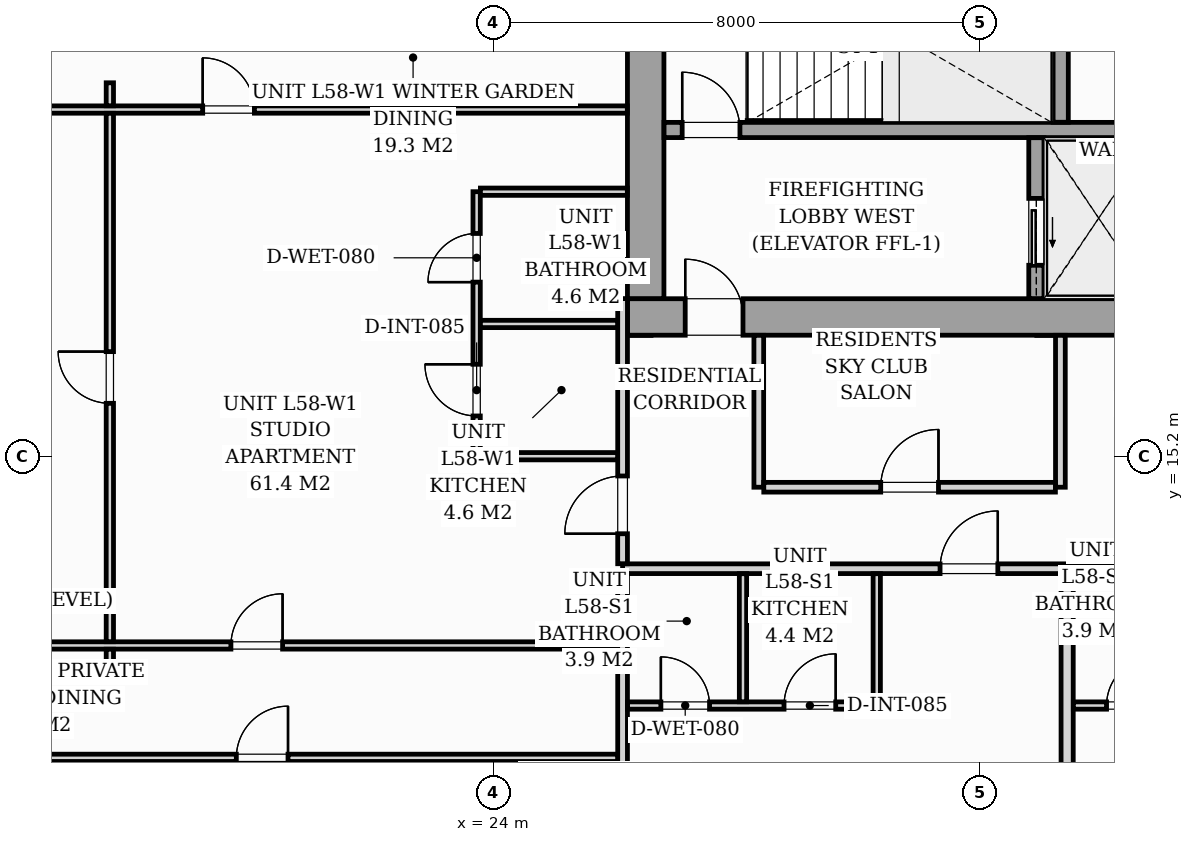
"""IFC4 building model, lengths in metres.
Left out: names, types, materials, properties, quantities, classifications, styles, units other than length and angle.
Written with IfcOpenShell. Run it as: python <this file> out.ifc"""

import sys

from ifc_helpers import new_model, si_unit, direction, frame, frame_2d, origin, origin_2d, place, context, subcontext, project, spatial, rectangle, i_section, extrude, source, transform, mapped, element, fill, save


model = new_model("IFC4")
c1 = context("Model", 3, precision=1e-05, world=origin(), true_north=direction((0.0, 1.0)))
c2 = subcontext(c1, "Body", "Model", "MODEL_VIEW")
j1 = project(units=[si_unit("LENGTHUNIT", "METRE"), si_unit("PLANEANGLEUNIT", "RADIAN")], contexts=[c1])
p1 = place(None, origin())
s1 = spatial("IfcSite", under=j1, at=p1, CompositionType="ELEMENT")
p2 = place(p1, origin())
s2 = spatial("IfcBuilding", under=s1, at=p2, CompositionType="ELEMENT")
p3 = place(p2, frame((0.0, 0.0, 201.8)))
s3 = spatial("IfcBuildingStorey", under=s2, at=p3, CompositionType="ELEMENT", Elevation=201.8)
m1 = source(origin(), c2, "Body", "SweptSolid", [
    extrude(i_section(OverallWidth=0.416, OverallDepth=0.446, WebThickness=0.039, FlangeThickness=0.063, FilletRadius=0.018, at=origin_2d()), origin(), (0.0, 0.0, 1.0), 3.196),
])
for number, where, z_axis, x_axis in (
    (1, (26.4, 17.4, 0.002), (0.0, 0.0, 1.0), (1.0, 0.0, 0.0)),
    (2, (33.12, 17.4, 0.002), (0.0, 0.0, 1.0), (1.0, 0.0, 0.0)),
):
    element("IfcColumn", number, at=place(p3, frame(where, z_axis=z_axis, x_axis=x_axis)), inside=s3, PredefinedType="PILASTER", context=c2, shape_type="MappedRepresentation", body=[
        mapped(m1, transform((0.0, 0.0, 0.0), scale=1.0)),
    ])
p4 = place(p3, frame((26.2, 17.5, 0.0), z_axis=(0.0, 0.0, 1.0), x_axis=(1.0, 0.0, 0.0)))
e3 = element("IfcWall", 3, at=p4, inside=s3, PredefinedType="SHEAR", context=c2, shape_type="SweptSolid", body=[
    extrude(rectangle(XDim=19.6, YDim=0.6, at=frame_2d((9.8, 0.0))), origin(), (0.0, 0.0, 1.0), 3.2),
])
p5 = place(p4, frame((0.95, 0.0, 0.0)))
e4 = element("IfcOpeningElement", 4, at=p5, cuts=e3, PredefinedType="OPENING", context=c2, shape_type="SweptSolid", body=[
    extrude(rectangle(XDim=0.95, YDim=2.06, at=frame_2d((0.475, 1.03))), frame((0.0, 0.31, 0.0), z_axis=(0.0, -1.0, 0.0), x_axis=(1.0, 0.0, 0.0)), (0.0, 0.0, 1.0), 0.62),
])
p6 = place(p4, frame((9.38, 0.0, 0.0)))
e5 = element("IfcOpeningElement", 5, at=p6, cuts=e3, PredefinedType="OPENING", context=c2, shape_type="SweptSolid", body=[
    extrude(rectangle(XDim=0.85, YDim=2.0, at=frame_2d((0.425, 1.0))), frame((0.0, 0.31, 0.0), z_axis=(0.0, -1.0, 0.0), x_axis=(1.0, 0.0, 0.0)), (0.0, 0.0, 1.0), 0.62),
])
p7 = place(p4, frame((17.55, 0.0, 0.0)))
e6 = element("IfcOpeningElement", 6, at=p7, cuts=e3, PredefinedType="OPENING", context=c2, shape_type="SweptSolid", body=[
    extrude(rectangle(XDim=0.95, YDim=2.06, at=frame_2d((0.475, 1.03))), frame((0.0, 0.31, 0.0), z_axis=(0.0, -1.0, 0.0), x_axis=(1.0, 0.0, 0.0)), (0.0, 0.0, 1.0), 0.62),
])
p8 = place(p3, frame((26.5, 17.802, 0.0), z_axis=(0.0, 0.0, 1.0), x_axis=(0.0, 1.0, 0.0)))
e7 = element("IfcWall", 7, at=p8, inside=s3, PredefinedType="SHEAR", context=c2, shape_type="SweptSolid", body=[
    extrude(rectangle(XDim=5.796, YDim=0.6, at=frame_2d((2.898, 0.0))), origin(), (0.0, 0.0, 1.0), 3.2),
])
p9 = place(p3, frame((26.802, 20.575, 0.0), z_axis=(0.0, 0.0, 1.0), x_axis=(1.0, 0.0, 0.0)))
e8 = element("IfcWall", 8, at=p9, inside=s3, PredefinedType="SOLIDWALL", context=c2, shape_type="SweptSolid", body=[
    extrude(rectangle(XDim=8.148, YDim=0.25, at=frame_2d((4.074, 0.0))), origin(), (0.0, 0.0, 1.0), 3.2),
])
p10 = place(p9, frame((0.298, 0.0, 0.0)))
e9 = element("IfcOpeningElement", 9, at=p10, cuts=e8, PredefinedType="OPENING", context=c2, shape_type="SweptSolid", body=[
    extrude(rectangle(XDim=0.95, YDim=2.06, at=frame_2d((0.475, 1.03))), frame((0.0, 0.135, 0.0), z_axis=(0.0, -1.0, 0.0), x_axis=(1.0, 0.0, 0.0)), (0.0, 0.0, 1.0), 0.27),
])
p11 = place(p3, frame((33.325, 20.702, 0.0), z_axis=(0.0, 0.0, 1.0), x_axis=(0.0, 1.0, 0.0)))
e10 = element("IfcWall", 10, at=p11, inside=s3, PredefinedType="SOLIDWALL", context=c2, shape_type="SweptSolid", body=[
    extrude(rectangle(XDim=2.896, YDim=0.25, at=frame_2d((1.448, 0.0))), origin(), (0.0, 0.0, 1.0), 3.2),
])
p12 = place(p3, frame((32.925, 17.802, 0.0), z_axis=(0.0, 0.0, 1.0), x_axis=(0.0, 1.0, 0.0)))
e11 = element("IfcWall", 11, at=p12, inside=s3, PredefinedType="SOLIDWALL", context=c2, shape_type="SweptSolid", body=[
    extrude(rectangle(XDim=2.646, YDim=0.25, at=frame_2d((1.323, 0.0))), origin(), (0.0, 0.0, 1.0), 3.2),
])
p13 = place(p12, frame((0.548, 0.0, 0.0)))
e12 = element("IfcOpeningElement", 12, at=p13, cuts=e11, PredefinedType="OPENING", context=c2, shape_type="SweptSolid", body=[
    extrude(rectangle(XDim=1.1, YDim=2.08, at=frame_2d((0.55, 1.04))), frame((0.0, 0.135, 0.0), z_axis=(0.0, -1.0, 0.0), x_axis=(1.0, 0.0, 0.0)), (0.0, 0.0, 1.0), 0.27),
])
p14 = place(p3, frame((26.12, 13.36, 0.0), z_axis=(0.0, 0.0, 1.0), x_axis=(1.0, 0.0, 0.0)))
e13 = element("IfcWall", 13, at=p14, inside=s3, PredefinedType="PARTITIONING", context=c2, shape_type="SweptSolid", body=[
    extrude(rectangle(XDim=19.76, YDim=0.16, at=frame_2d((9.88, 0.0))), origin(), (0.0, 0.0, 1.0), 2.94),
])
p15 = place(p14, frame((5.221, 0.0, 0.0)))
e14 = element("IfcOpeningElement", 14, at=p15, cuts=e13, PredefinedType="OPENING", context=c2, shape_type="SweptSolid", body=[
    extrude(rectangle(XDim=0.95, YDim=2.06, at=frame_2d((0.475, 1.03))), frame((0.0, 0.09, 0.0), z_axis=(0.0, -1.0, 0.0), x_axis=(1.0, 0.0, 0.0)), (0.0, 0.0, 1.0), 0.18),
])
p16 = place(p14, frame((12.119, 0.0, 0.0)))
e15 = element("IfcOpeningElement", 15, at=p16, cuts=e13, PredefinedType="OPENING", context=c2, shape_type="SweptSolid", body=[
    extrude(rectangle(XDim=0.95, YDim=2.06, at=frame_2d((0.475, 1.03))), frame((0.0, 0.09, 0.0), z_axis=(0.0, -1.0, 0.0), x_axis=(1.0, 0.0, 0.0)), (0.0, 0.0, 1.0), 0.18),
])
p17 = place(p14, frame((14.492, 0.0, 0.0)))
e16 = element("IfcOpeningElement", 16, at=p17, cuts=e13, PredefinedType="OPENING", context=c2, shape_type="SweptSolid", body=[
    extrude(rectangle(XDim=0.95, YDim=2.06, at=frame_2d((0.475, 1.03))), frame((0.0, 0.09, 0.0), z_axis=(0.0, -1.0, 0.0), x_axis=(1.0, 0.0, 0.0)), (0.0, 0.0, 1.0), 0.18),
])
p18 = place(p3, frame((26.12, 7.261, 0.0), z_axis=(0.0, 0.0, 1.0), x_axis=(0.0, 1.0, 0.0)))
e17 = element("IfcWall", 17, at=p18, inside=s3, PredefinedType="PARTITIONING", context=c2, shape_type="SweptSolid", body=[
    extrude(rectangle(XDim=6.017, YDim=0.16, at=frame_2d((3.008, 0.0))), origin(), (0.0, 0.0, 1.0), 2.94),
])
p19 = place(p3, frame((26.12, 13.442, 0.0), z_axis=(0.0, 0.0, 1.0), x_axis=(0.0, 1.0, 0.0)))
e18 = element("IfcWall", 18, at=p19, inside=s3, PredefinedType="PARTITIONING", context=c2, shape_type="SweptSolid", body=[
    extrude(rectangle(XDim=4.36, YDim=0.16, at=frame_2d((2.18, 0.0))), origin(), (0.0, 0.0, 1.0), 2.94),
])
p20 = place(p19, frame((0.493, 0.0, 0.0)))
e19 = element("IfcOpeningElement", 19, at=p20, cuts=e18, PredefinedType="OPENING", context=c2, shape_type="SweptSolid", body=[
    extrude(rectangle(XDim=0.95, YDim=2.06, at=frame_2d((0.475, 1.03))), frame((0.0, 0.09, 0.0), z_axis=(0.0, -1.0, 0.0), x_axis=(1.0, 0.0, 0.0)), (0.0, 0.0, 1.0), 0.18),
])
p21 = place(p3, frame((26.202, 11.11, 0.0), z_axis=(0.0, 0.0, 1.0), x_axis=(1.0, 0.0, 0.0)))
e20 = element("IfcWall", 20, at=p21, inside=s3, PredefinedType="PARTITIONING", context=c2, shape_type="SweptSolid", body=[
    extrude(rectangle(XDim=4.098, YDim=0.12, at=frame_2d((2.049, 0.0))), origin(), (0.0, 0.0, 1.0), 2.94),
])
p22 = place(p21, frame((0.548, 0.0, 0.0)))
e21 = element("IfcOpeningElement", 21, at=p22, cuts=e20, PredefinedType="OPENING", context=c2, shape_type="SweptSolid", body=[
    extrude(rectangle(XDim=0.8, YDim=2.02, at=frame_2d((0.4, 1.01))), frame((0.0, 0.07, 0.0), z_axis=(0.0, -1.0, 0.0), x_axis=(1.0, 0.0, 0.0)), (0.0, 0.0, 1.0), 0.14),
])
p23 = place(p21, frame((2.573, 0.0, 0.0)))
e22 = element("IfcOpeningElement", 22, at=p23, cuts=e20, PredefinedType="OPENING", context=c2, shape_type="SweptSolid", body=[
    extrude(rectangle(XDim=0.85, YDim=2.05, at=frame_2d((0.425, 1.025))), frame((0.0, 0.07, 0.0), z_axis=(0.0, -1.0, 0.0), x_axis=(1.0, 0.0, 0.0)), (0.0, 0.0, 1.0), 0.14),
])
for number, where, z_axis, x_axis in (
    (23, (30.3, 11.172, 0.0), (0.0, 0.0, 1.0), (0.0, 1.0, 0.0)),
    (24, (28.1, 11.172, 0.0), (0.0, 0.0, 1.0), (0.0, 1.0, 0.0)),
):
    element("IfcWall", number, at=place(p3, frame(where, z_axis=z_axis, x_axis=x_axis)), inside=s3, PredefinedType="PARTITIONING", context=c2, shape_type="SweptSolid", body=[
        extrude(rectangle(XDim=2.106, YDim=0.12, at=frame_2d((1.053, 0.0))), origin(), (0.0, 0.0, 1.0), 2.94),
    ])
p24 = place(p3, frame((33.431, 7.782, 0.0), z_axis=(0.0, 0.0, 1.0), x_axis=(0.0, 1.0, 0.0)))
e25 = element("IfcWall", 25, at=p24, inside=s3, PredefinedType="PARTITIONING", context=c2, shape_type="SweptSolid", body=[
    extrude(rectangle(XDim=5.496, YDim=0.2, at=frame_2d((2.748, 0.0))), origin(), (0.0, 0.0, 1.0), 2.94),
])
p25 = place(p3, frame((33.533, 11.11, 0.0), z_axis=(0.0, 0.0, 1.0), x_axis=(1.0, 0.0, 0.0)))
e26 = element("IfcWall", 26, at=p25, inside=s3, PredefinedType="PARTITIONING", context=c2, shape_type="SweptSolid", body=[
    extrude(rectangle(XDim=4.043, YDim=0.12, at=frame_2d((2.021, 0.0))), origin(), (0.0, 0.0, 1.0), 2.94),
])
p26 = place(p25, frame((0.546, 0.0, 0.0)))
e27 = element("IfcOpeningElement", 27, at=p26, cuts=e26, PredefinedType="OPENING", context=c2, shape_type="SweptSolid", body=[
    extrude(rectangle(XDim=0.8, YDim=2.02, at=frame_2d((0.4, 1.01))), frame((0.0, 0.07, 0.0), z_axis=(0.0, -1.0, 0.0), x_axis=(1.0, 0.0, 0.0)), (0.0, 0.0, 1.0), 0.14),
])
p27 = place(p25, frame((2.544, 0.0, 0.0)))
e28 = element("IfcOpeningElement", 28, at=p27, cuts=e26, PredefinedType="OPENING", context=c2, shape_type="SweptSolid", body=[
    extrude(rectangle(XDim=0.85, YDim=2.05, at=frame_2d((0.425, 1.025))), frame((0.0, 0.07, 0.0), z_axis=(0.0, -1.0, 0.0), x_axis=(1.0, 0.0, 0.0)), (0.0, 0.0, 1.0), 0.14),
])
p28 = place(p3, frame((23.72, 15.21, 0.0), z_axis=(0.0, 0.0, 1.0), x_axis=(0.0, 1.0, 0.0)))
e29 = element("IfcWall", 29, at=p28, inside=s3, PredefinedType="PARTITIONING", context=c2, shape_type="SweptSolid", body=[
    extrude(rectangle(XDim=4.35, YDim=0.12, at=frame_2d((2.175, 0.0))), origin(), (0.0, 0.0, 1.0), 2.94),
])
p29 = place(p28, frame((0.662, 0.0, 0.0)))
e30 = element("IfcOpeningElement", 30, at=p29, cuts=e29, PredefinedType="OPENING", context=c2, shape_type="SweptSolid", body=[
    extrude(rectangle(XDim=0.85, YDim=2.05, at=frame_2d((0.425, 1.025))), frame((0.0, 0.07, 0.0), z_axis=(0.0, -1.0, 0.0), x_axis=(1.0, 0.0, 0.0)), (0.0, 0.0, 1.0), 0.14),
])
p30 = place(p28, frame((2.863, 0.0, 0.0)))
e31 = element("IfcOpeningElement", 31, at=p30, cuts=e29, PredefinedType="OPENING", context=c2, shape_type="SweptSolid", body=[
    extrude(rectangle(XDim=0.8, YDim=2.02, at=frame_2d((0.4, 1.01))), frame((0.0, 0.07, 0.0), z_axis=(0.0, -1.0, 0.0), x_axis=(1.0, 0.0, 0.0)), (0.0, 0.0, 1.0), 0.14),
])
p31 = place(p3, frame((23.782, 17.385, 0.0), z_axis=(0.0, 0.0, 1.0), x_axis=(1.0, 0.0, 0.0)))
e32 = element("IfcWall", 32, at=p31, inside=s3, PredefinedType="PARTITIONING", context=c2, shape_type="SweptSolid", body=[
    extrude(rectangle(XDim=2.256, YDim=0.12, at=frame_2d((1.128, 0.0))), origin(), (0.0, 0.0, 1.0), 2.281),
])
p32 = place(p3, frame((23.782, 15.21, 0.0), z_axis=(0.0, 0.0, 1.0), x_axis=(1.0, 0.0, 0.0)))
e33 = element("IfcWall", 33, at=p32, inside=s3, PredefinedType="PARTITIONING", context=c2, shape_type="SweptSolid", body=[
    extrude(rectangle(XDim=2.256, YDim=0.12, at=frame_2d((1.128, 0.0))), origin(), (0.0, 0.0, 1.0), 2.94),
])
p33 = place(p3, frame((23.782, 19.56, 0.0), z_axis=(0.0, 0.0, 1.0), x_axis=(1.0, 0.0, 0.0)))
e34 = element("IfcWall", 34, at=p33, inside=s3, PredefinedType="PARTITIONING", context=c2, shape_type="SweptSolid", body=[
    extrude(rectangle(XDim=2.416, YDim=0.12, at=frame_2d((1.208, 0.0))), origin(), (0.0, 0.0, 1.0), 2.94),
])
p34 = place(p3, frame((14.361, 10.25, 0.0), z_axis=(0.0, 0.0, 1.0), x_axis=(1.0, 0.0, 0.0)))
e35 = element("IfcWall", 35, at=p34, inside=s3, PredefinedType="PARTITIONING", context=c2, shape_type="SweptSolid", body=[
    extrude(rectangle(XDim=11.677, YDim=0.12, at=frame_2d((5.839, 0.0))), origin(), (0.0, 0.0, 1.0), 2.94),
])
p35 = place(p34, frame((5.407, 0.0, 0.0)))
e36 = element("IfcOpeningElement", 36, at=p35, cuts=e35, PredefinedType="OPENING", context=c2, shape_type="SweptSolid", body=[
    extrude(rectangle(XDim=0.85, YDim=2.05, at=frame_2d((0.425, 1.025))), frame((0.0, 0.07, 0.0), z_axis=(0.0, -1.0, 0.0), x_axis=(1.0, 0.0, 0.0)), (0.0, 0.0, 1.0), 0.14),
])
p36 = place(p3, frame((14.183, 12.098, 0.0), z_axis=(0.0, 0.0, 1.0), x_axis=(1.0, 0.0, 0.0)))
e37 = element("IfcWall", 37, at=p36, inside=s3, PredefinedType="PARTITIONING", context=c2, shape_type="SweptSolid", body=[
    extrude(rectangle(XDim=11.855, YDim=0.12, at=frame_2d((5.928, 0.0))), origin(), (0.0, 0.0, 1.0), 2.94),
])
p37 = place(p36, frame((5.496, 0.0, 0.0)))
e38 = element("IfcOpeningElement", 38, at=p37, cuts=e37, PredefinedType="OPENING", context=c2, shape_type="SweptSolid", body=[
    extrude(rectangle(XDim=0.85, YDim=2.05, at=frame_2d((0.425, 1.025))), frame((0.0, 0.07, 0.0), z_axis=(0.0, -1.0, 0.0), x_axis=(1.0, 0.0, 0.0)), (0.0, 0.0, 1.0), 0.14),
])
p38 = place(p3, frame((13.334, 20.911, 0.0), z_axis=(0.0, 0.0, 1.0), x_axis=(1.0, 0.0, 0.0)))
e39 = element("IfcWall", 39, at=p38, inside=s3, PredefinedType="PARTITIONING", context=c2, shape_type="SweptSolid", body=[
    extrude(rectangle(XDim=12.864, YDim=0.12, at=frame_2d((6.432, 0.0))), origin(), (0.0, 0.0, 1.0), 2.94),
])
p39 = place(p38, frame((5.881, 0.0, 0.0)))
e40 = element("IfcOpeningElement", 40, at=p39, cuts=e39, PredefinedType="OPENING", context=c2, shape_type="SweptSolid", body=[
    extrude(rectangle(XDim=0.85, YDim=2.05, at=frame_2d((0.425, 1.025))), frame((0.0, 0.07, 0.0), z_axis=(0.0, -1.0, 0.0), x_axis=(1.0, 0.0, 0.0)), (0.0, 0.0, 1.0), 0.14),
])
p40 = place(p3, frame((17.688, 11.658, 0.0), z_axis=(0.0, 0.0, 1.0), x_axis=(0.0, 1.0, 0.0)))
e41 = element("IfcWall", 41, at=p40, inside=s3, PredefinedType="PARTITIONING", context=c2, shape_type="SweptSolid", body=[
    extrude(rectangle(XDim=0.378, YDim=0.12, at=frame_2d((0.189, 0.0))), origin(), (0.0, 0.0, 1.0), 2.94),
])
p41 = place(p3, frame((17.688, 12.16, 0.0), z_axis=(0.0, 0.0, 1.0), x_axis=(0.0, 1.0, 0.0)))
e42 = element("IfcWall", 42, at=p41, inside=s3, PredefinedType="PARTITIONING", context=c2, shape_type="SweptSolid", body=[
    extrude(rectangle(XDim=8.689, YDim=0.12, at=frame_2d((4.345, 0.0))), origin(), (0.0, 0.0, 1.0), 2.94),
])
p42 = place(p41, frame((3.92, 0.0, 0.0)))
e43 = element("IfcOpeningElement", 43, at=p42, cuts=e42, PredefinedType="OPENING", context=c2, shape_type="SweptSolid", body=[
    extrude(rectangle(XDim=0.85, YDim=2.05, at=frame_2d((0.425, 1.025))), frame((0.0, 0.07, 0.0), z_axis=(0.0, -1.0, 0.0), x_axis=(1.0, 0.0, 0.0)), (0.0, 0.0, 1.0), 0.14),
])
p43 = place(p3, frame((17.688, 20.973, 0.0), z_axis=(0.0, 0.0, 1.0), x_axis=(0.0, 1.0, 0.0)))
e44 = element("IfcWall", 44, at=p43, inside=s3, PredefinedType="PARTITIONING", context=c2, shape_type="SweptSolid", body=[
    extrude(rectangle(XDim=0.378, YDim=0.12, at=frame_2d((0.189, 0.0))), origin(), (0.0, 0.0, 1.0), 2.94),
])
for number, where, z_axis, x_axis in (
    (45, (28.36, 14.7, 0.0), (0.0, 0.0, 1.0), (0.0, 1.0, 0.0)),
    (46, (33.32, 14.7, 0.0), (0.0, 0.0, 1.0), (0.0, 1.0, 0.0)),
):
    element("IfcWall", number, at=place(p3, frame(where, z_axis=z_axis, x_axis=x_axis)), inside=s3, PredefinedType="PARTITIONING", context=c2, shape_type="SweptSolid", body=[
        extrude(rectangle(XDim=2.498, YDim=0.16, at=frame_2d((1.249, 0.0))), origin(), (0.0, 0.0, 1.0), 2.94),
    ])
p44 = place(p3, frame((28.442, 14.7, 0.0), z_axis=(0.0, 0.0, 1.0), x_axis=(1.0, 0.0, 0.0)))
e47 = element("IfcWall", 47, at=p44, inside=s3, PredefinedType="PARTITIONING", context=c2, shape_type="SweptSolid", body=[
    extrude(rectangle(XDim=4.796, YDim=0.16, at=frame_2d((2.398, 0.0))), origin(), (0.0, 0.0, 1.0), 2.94),
])
p45 = place(p44, frame((1.923, 0.0, 0.0)))
e48 = element("IfcOpeningElement", 48, at=p45, cuts=e47, PredefinedType="OPENING", context=c2, shape_type="SweptSolid", body=[
    extrude(rectangle(XDim=0.95, YDim=2.06, at=frame_2d((0.475, 1.03))), frame((0.0, 0.09, 0.0), z_axis=(0.0, -1.0, 0.0), x_axis=(1.0, 0.0, 0.0)), (0.0, 0.0, 1.0), 0.18),
])
m2 = source(origin(), c2, "Body", "SweptSolid", [
    extrude(rectangle(XDim=0.95, YDim=2.06, at=frame_2d((0.475, 1.03))), frame((0.0, 0.025, 0.0), z_axis=(0.0, -1.0, 0.0), x_axis=(1.0, 0.0, 0.0)), (0.0, 0.0, 1.0), 0.05),
])
p46 = place(p5, origin())
e49 = element("IfcDoor", 49, at=p46, inside=s3, OperationType="SINGLE_SWING_LEFT", PredefinedType="DOOR", context=c2, shape_type="MappedRepresentation", body=[
    mapped(m2, transform((0.0, 0.0, 0.0), scale=1.0)),
])
fill(e4, e49)
p47 = place(p10, origin())
e50 = element("IfcDoor", 50, at=p47, inside=s3, OperationType="SINGLE_SWING_LEFT", PredefinedType="DOOR", context=c2, shape_type="MappedRepresentation", body=[
    mapped(m2, transform((0.0, 0.0, 0.0), scale=1.0)),
])
fill(e9, e50)
m3 = source(origin(), c2, "Body", "SweptSolid", [
    extrude(rectangle(XDim=1.1, YDim=2.08, at=frame_2d((0.55, 1.04))), frame((0.0, 0.025, 0.0), z_axis=(0.0, -1.0, 0.0), x_axis=(1.0, 0.0, 0.0)), (0.0, 0.0, 1.0), 0.05),
])
p48 = place(p13, origin())
e51 = element("IfcDoor", 51, at=p48, inside=s3, OperationType="SLIDING_TO_LEFT", PredefinedType="DOOR", context=c2, shape_type="MappedRepresentation", body=[
    mapped(m3, transform((0.0, 0.0, 0.0), scale=1.0)),
])
fill(e12, e51)
m4 = source(origin(), c2, "Body", "SweptSolid", [
    extrude(rectangle(XDim=0.95, YDim=2.06, at=frame_2d((0.475, 1.03))), frame((0.0, 0.025, 0.0), z_axis=(0.0, -1.0, 0.0), x_axis=(1.0, 0.0, 0.0)), (0.0, 0.0, 1.0), 0.05),
])
p49 = place(p15, origin())
e52 = element("IfcDoor", 52, at=p49, inside=s3, OperationType="SINGLE_SWING_RIGHT", PredefinedType="DOOR", context=c2, shape_type="MappedRepresentation", body=[
    mapped(m4, transform((0.0, 0.0, 0.0), scale=1.0)),
])
fill(e14, e52)
m5 = source(origin(), c2, "Body", "SweptSolid", [
    extrude(rectangle(XDim=0.8, YDim=2.02, at=frame_2d((0.4, 1.01))), frame((0.0, 0.025, 0.0), z_axis=(0.0, -1.0, 0.0), x_axis=(1.0, 0.0, 0.0)), (0.0, 0.0, 1.0), 0.05),
])
p50 = place(p22, origin())
e53 = element("IfcDoor", 53, at=p50, inside=s3, OperationType="SINGLE_SWING_LEFT", PredefinedType="DOOR", context=c2, shape_type="MappedRepresentation", body=[
    mapped(m5, transform((0.0, 0.0, 0.0), scale=1.0)),
])
fill(e21, e53)
m6 = source(origin(), c2, "Body", "SweptSolid", [
    extrude(rectangle(XDim=0.85, YDim=2.05, at=frame_2d((0.425, 1.025))), frame((0.0, 0.025, 0.0), z_axis=(0.0, -1.0, 0.0), x_axis=(1.0, 0.0, 0.0)), (0.0, 0.0, 1.0), 0.05),
])
p51 = place(p23, origin())
e54 = element("IfcDoor", 54, at=p51, inside=s3, OperationType="SINGLE_SWING_RIGHT", PredefinedType="DOOR", context=c2, shape_type="MappedRepresentation", body=[
    mapped(m6, transform((0.0, 0.0, 0.0), scale=1.0)),
])
fill(e22, e54)
p52 = place(p26, origin())
e55 = element("IfcDoor", 55, at=p52, inside=s3, OperationType="SINGLE_SWING_RIGHT", PredefinedType="DOOR", context=c2, shape_type="MappedRepresentation", body=[
    mapped(m5, transform((0.0, 0.0, 0.0), scale=1.0)),
])
fill(e27, e55)
p53 = place(p20, origin())
e56 = element("IfcDoor", 56, at=p53, inside=s3, OperationType="SINGLE_SWING_LEFT", PredefinedType="DOOR", context=c2, shape_type="MappedRepresentation", body=[
    mapped(m4, transform((0.0, 0.0, 0.0), scale=1.0)),
])
fill(e19, e56)
p54 = place(p29, origin())
e57 = element("IfcDoor", 57, at=p54, inside=s3, OperationType="SINGLE_SWING_RIGHT", PredefinedType="DOOR", context=c2, shape_type="MappedRepresentation", body=[
    mapped(m6, transform((0.0, 0.0, 0.0), scale=1.0)),
])
fill(e30, e57)
p55 = place(p30, origin())
e58 = element("IfcDoor", 58, at=p55, inside=s3, OperationType="SINGLE_SWING_LEFT", PredefinedType="DOOR", context=c2, shape_type="MappedRepresentation", body=[
    mapped(m5, transform((0.0, 0.0, 0.0), scale=1.0)),
])
fill(e31, e58)
p56 = place(p35, origin())
e59 = element("IfcDoor", 59, at=p56, inside=s3, OperationType="SINGLE_SWING_RIGHT", PredefinedType="DOOR", context=c2, shape_type="MappedRepresentation", body=[
    mapped(m6, transform((0.0, 0.0, 0.0), scale=1.0)),
])
fill(e36, e59)
p57 = place(p37, origin())
e60 = element("IfcDoor", 60, at=p57, inside=s3, OperationType="SINGLE_SWING_RIGHT", PredefinedType="DOOR", context=c2, shape_type="MappedRepresentation", body=[
    mapped(m6, transform((0.0, 0.0, 0.0), scale=1.0)),
])
fill(e38, e60)
p58 = place(p39, origin())
e61 = element("IfcDoor", 61, at=p58, inside=s3, OperationType="SINGLE_SWING_LEFT", PredefinedType="DOOR", context=c2, shape_type="MappedRepresentation", body=[
    mapped(m6, transform((0.0, 0.0, 0.0), scale=1.0)),
])
fill(e40, e61)
p59 = place(p42, origin())
e62 = element("IfcDoor", 62, at=p59, inside=s3, OperationType="SINGLE_SWING_RIGHT", PredefinedType="DOOR", context=c2, shape_type="MappedRepresentation", body=[
    mapped(m6, transform((0.0, 0.0, 0.0), scale=1.0)),
])
fill(e43, e62)
p60 = place(p45, origin())
e63 = element("IfcDoor", 63, at=p60, inside=s3, OperationType="SINGLE_SWING_RIGHT", PredefinedType="DOOR", context=c2, shape_type="MappedRepresentation", body=[
    mapped(m4, transform((0.0, 0.0, 0.0), scale=1.0)),
])
fill(e48, e63)
save(model, sys.argv[1])
